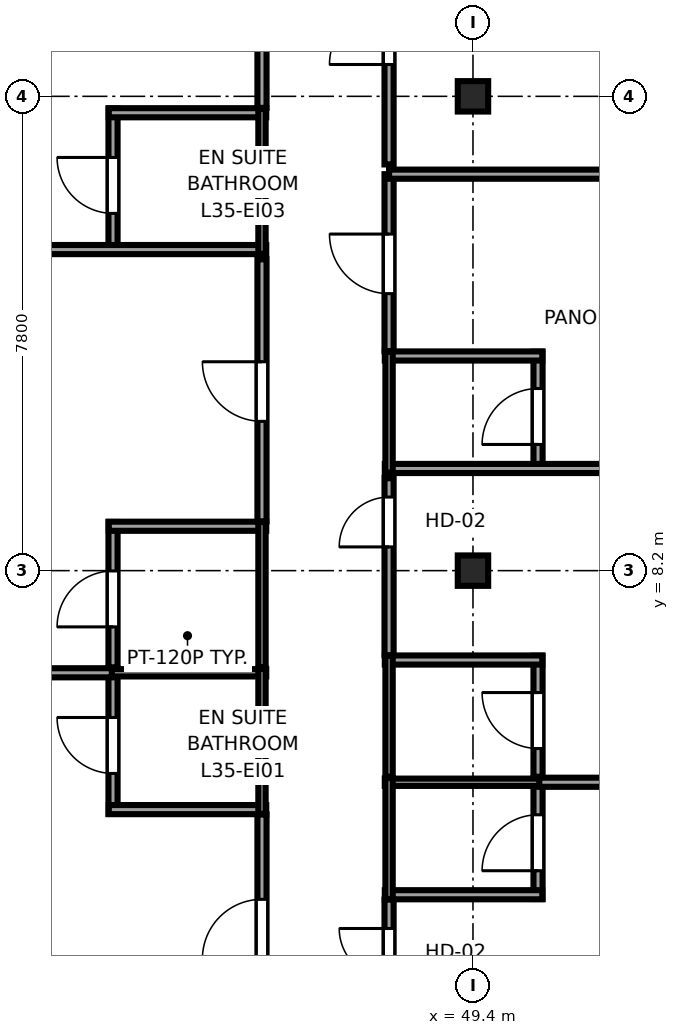
"""IFC4 building model, lengths in metres.
Left out: names, types, materials, properties, quantities, classifications, styles, units other than length and angle.
Written with IfcOpenShell. Run it as: python <this file> out.ifc"""

import sys

from ifc_helpers import new_model, si_unit, direction, frame, frame_2d, origin, origin_2d, place, context, subcontext, project, spatial, rectangle, i_section, extrude, source, transform, mapped, element, fill, save


model = new_model("IFC4")
c1 = context("Model", 3, precision=1e-05, world=origin(), true_north=direction((0.0, 1.0)))
c2 = subcontext(c1, "Body", "Model", "MODEL_VIEW")
j1 = project(units=[si_unit("LENGTHUNIT", "METRE"), si_unit("PLANEANGLEUNIT", "RADIAN")], contexts=[c1])
p1 = place(None, origin())
s1 = spatial("IfcSite", under=j1, at=p1, CompositionType="ELEMENT")
p2 = place(p1, origin())
s2 = spatial("IfcBuilding", under=s1, at=p2, CompositionType="ELEMENT")
p3 = place(p2, frame((0.0, 0.0, 136.4)))
s3 = spatial("IfcBuildingStorey", under=s2, at=p3, CompositionType="ELEMENT", Elevation=136.4)
m1 = source(origin(), c2, "Body", "SweptSolid", [
    extrude(i_section(OverallWidth=0.5, OverallDepth=0.5, WebThickness=0.022, FlangeThickness=0.034, at=origin_2d()), origin(), (0.0, 0.0, 1.0), 3.55),
])
for number, where, z_axis, x_axis in (
    (1, (49.4, 8.2, 0.0), (0.0, 0.0, 1.0), (1.0, 0.0, 0.0)),
    (2, (49.4, 16.0, 0.0), (0.0, 0.0, 1.0), (1.0, 0.0, 0.0)),
):
    element("IfcColumn", number, at=place(p3, frame(where, z_axis=z_axis, x_axis=x_axis)), inside=s3, PredefinedType="COLUMN", context=c2, shape_type="MappedRepresentation", body=[
        mapped(m1, transform((0.0, 0.0, 0.0), x_axis=(1.0, 0.0, 0.0), y_axis=(0.0, 1.0, 0.0), z_axis=(0.0, 0.0, 1.0), scale=1.0)),
    ])
p4 = place(p3, frame((43.48, 4.2, 0.0), z_axis=(0.0, 0.0, 1.0), x_axis=(0.0, 1.0, 0.0)))
e3 = element("IfcWall", 3, at=p4, inside=s3, PredefinedType="PARTITIONING", context=c2, shape_type="SweptSolid", body=[
    extrude(rectangle(XDim=2.39, YDim=0.15, at=frame_2d((1.195, 0.0))), origin(), (0.0, 0.0, 1.0), 3.37),
])
p5 = place(p4, frame((0.665, 0.0, 0.0)))
e4 = element("IfcOpeningElement", 4, at=p5, cuts=e3, PredefinedType="OPENING", context=c2, shape_type="SweptSolid", body=[
    extrude(rectangle(XDim=0.92, YDim=2.01, at=frame_2d((0.46, 1.005))), frame((0.0, 0.085, 0.0), z_axis=(0.0, -1.0, 0.0), x_axis=(1.0, 0.0, 0.0)), (0.0, 0.0, 1.0), 0.17),
])
p6 = place(p3, frame((43.41, 4.27, 0.0), z_axis=(0.0, 0.0, 1.0), x_axis=(1.0, 0.0, 0.0)))
e5 = element("IfcWall", 5, at=p6, inside=s3, PredefinedType="PARTITIONING", context=c2, shape_type="SweptSolid", body=[
    extrude(rectangle(XDim=2.59, YDim=0.15, at=frame_2d((1.295, 0.0))), origin(), (0.0, 0.0, 1.0), 3.37),
])
p7 = place(p3, frame((43.41, 6.52, 0.0), z_axis=(0.0, 0.0, 1.0), x_axis=(1.0, 0.0, 0.0)))
e6 = element("IfcWall", 6, at=p7, inside=s3, PredefinedType="PLUMBINGWALL", context=c2, shape_type="SweptSolid", body=[
    extrude(rectangle(XDim=2.59, YDim=0.12, at=frame_2d((1.295, 0.0))), origin(), (0.0, 0.0, 1.0), 3.37),
])
p8 = place(p3, frame((45.93, 4.2, 0.0), z_axis=(0.0, 0.0, 1.0), x_axis=(0.0, 1.0, 0.0)))
e7 = element("IfcWall", 7, at=p8, inside=s3, PredefinedType="PLUMBINGWALL", context=c2, shape_type="SweptSolid", body=[
    extrude(rectangle(XDim=2.39, YDim=0.12, at=frame_2d((1.195, 0.0))), origin(), (0.0, 0.0, 1.0), 3.37),
])
p9 = place(p3, frame((43.48, 6.61, 0.0), z_axis=(0.0, 0.0, 1.0), x_axis=(0.0, 1.0, 0.0)))
e8 = element("IfcWall", 8, at=p9, inside=s3, PredefinedType="PARTITIONING", context=c2, shape_type="SweptSolid", body=[
    extrude(rectangle(XDim=2.39, YDim=0.15, at=frame_2d((1.195, 0.0))), origin(), (0.0, 0.0, 1.0), 3.37),
])
p10 = place(p9, frame((0.665, 0.0, 0.0)))
e9 = element("IfcOpeningElement", 9, at=p10, cuts=e8, PredefinedType="OPENING", context=c2, shape_type="SweptSolid", body=[
    extrude(rectangle(XDim=0.92, YDim=2.01, at=frame_2d((0.46, 1.005))), frame((0.0, 0.085, 0.0), z_axis=(0.0, -1.0, 0.0), x_axis=(1.0, 0.0, 0.0)), (0.0, 0.0, 1.0), 0.17),
])
p11 = place(p3, frame((43.41, 8.93, 0.0), z_axis=(0.0, 0.0, 1.0), x_axis=(1.0, 0.0, 0.0)))
e10 = element("IfcWall", 10, at=p11, inside=s3, PredefinedType="PARTITIONING", context=c2, shape_type="SweptSolid", body=[
    extrude(rectangle(XDim=2.59, YDim=0.15, at=frame_2d((1.295, 0.0))), origin(), (0.0, 0.0, 1.0), 3.37),
])
p12 = place(p3, frame((45.93, 6.61, 0.0), z_axis=(0.0, 0.0, 1.0), x_axis=(0.0, 1.0, 0.0)))
e11 = element("IfcWall", 11, at=p12, inside=s3, PredefinedType="PLUMBINGWALL", context=c2, shape_type="SweptSolid", body=[
    extrude(rectangle(XDim=2.39, YDim=0.12, at=frame_2d((1.195, 0.0))), origin(), (0.0, 0.0, 1.0), 3.37),
])
p13 = place(p3, frame((43.48, 13.41, 0.0), z_axis=(0.0, 0.0, 1.0), x_axis=(0.0, 1.0, 0.0)))
e12 = element("IfcWall", 12, at=p13, inside=s3, PredefinedType="PARTITIONING", context=c2, shape_type="SweptSolid", body=[
    extrude(rectangle(XDim=2.39, YDim=0.15, at=frame_2d((1.195, 0.0))), origin(), (0.0, 0.0, 1.0), 3.37),
])
p14 = place(p13, frame((0.665, 0.0, 0.0)))
e13 = element("IfcOpeningElement", 13, at=p14, cuts=e12, PredefinedType="OPENING", context=c2, shape_type="SweptSolid", body=[
    extrude(rectangle(XDim=0.92, YDim=2.01, at=frame_2d((0.46, 1.005))), frame((0.0, 0.085, 0.0), z_axis=(0.0, -1.0, 0.0), x_axis=(1.0, 0.0, 0.0)), (0.0, 0.0, 1.0), 0.17),
])
p15 = place(p3, frame((34.65, 13.48, 0.0), z_axis=(0.0, 0.0, 1.0), x_axis=(1.0, 0.0, 0.0)))
e14 = element("IfcWall", 14, at=p15, inside=s3, PredefinedType="PARTITIONING", context=c2, shape_type="SweptSolid", body=[
    extrude(rectangle(XDim=11.35, YDim=0.15, at=frame_2d((5.675, 0.0))), origin(), (0.0, 0.0, 1.0), 3.37),
])
p16 = place(p3, frame((43.41, 15.73, 0.0), z_axis=(0.0, 0.0, 1.0), x_axis=(1.0, 0.0, 0.0)))
e15 = element("IfcWall", 15, at=p16, inside=s3, PredefinedType="PARTITIONING", context=c2, shape_type="SweptSolid", body=[
    extrude(rectangle(XDim=2.59, YDim=0.15, at=frame_2d((1.295, 0.0))), origin(), (0.0, 0.0, 1.0), 3.37),
])
p17 = place(p3, frame((45.93, 13.41, 0.0), z_axis=(0.0, 0.0, 1.0), x_axis=(0.0, 1.0, 0.0)))
e16 = element("IfcWall", 16, at=p17, inside=s3, PredefinedType="PLUMBINGWALL", context=c2, shape_type="SweptSolid", body=[
    extrude(rectangle(XDim=2.39, YDim=0.12, at=frame_2d((1.195, 0.0))), origin(), (0.0, 0.0, 1.0), 3.37),
])
p18 = place(p3, frame((50.47, 2.8, 0.0), z_axis=(0.0, 0.0, 1.0), x_axis=(0.0, 1.0, 0.0)))
e17 = element("IfcWall", 17, at=p18, inside=s3, PredefinedType="PARTITIONING", context=c2, shape_type="SweptSolid", body=[
    extrude(rectangle(XDim=1.99, YDim=0.15, at=frame_2d((0.995, 0.0))), origin(), (0.0, 0.0, 1.0), 3.37),
])
p19 = place(p18, frame((0.465, 0.0, 0.0)))
e18 = element("IfcOpeningElement", 18, at=p19, cuts=e17, PredefinedType="OPENING", context=c2, shape_type="SweptSolid", body=[
    extrude(rectangle(XDim=0.92, YDim=2.01, at=frame_2d((0.46, 1.005))), frame((0.0, 0.085, 0.0), z_axis=(0.0, -1.0, 0.0), x_axis=(1.0, 0.0, 0.0)), (0.0, 0.0, 1.0), 0.17),
])
p20 = place(p3, frame((47.95, 2.87, 0.0), z_axis=(0.0, 0.0, 1.0), x_axis=(1.0, 0.0, 0.0)))
e19 = element("IfcWall", 19, at=p20, inside=s3, PredefinedType="PARTITIONING", context=c2, shape_type="SweptSolid", body=[
    extrude(rectangle(XDim=2.59, YDim=0.15, at=frame_2d((1.295, 0.0))), origin(), (0.0, 0.0, 1.0), 3.37),
])
p21 = place(p3, frame((47.95, 4.72, 0.0), z_axis=(0.0, 0.0, 1.0), x_axis=(1.0, 0.0, 0.0)))
e20 = element("IfcWall", 20, at=p21, inside=s3, PredefinedType="PLUMBINGWALL", context=c2, shape_type="SweptSolid", body=[
    extrude(rectangle(XDim=2.59, YDim=0.12, at=frame_2d((1.295, 0.0))), origin(), (0.0, 0.0, 1.0), 3.37),
])
p22 = place(p3, frame((48.02, 2.8, 0.0), z_axis=(0.0, 0.0, 1.0), x_axis=(0.0, 1.0, 0.0)))
e21 = element("IfcWall", 21, at=p22, inside=s3, PredefinedType="PLUMBINGWALL", context=c2, shape_type="SweptSolid", body=[
    extrude(rectangle(XDim=1.99, YDim=0.12, at=frame_2d((0.995, 0.0))), origin(), (0.0, 0.0, 1.0), 3.37),
])
p23 = place(p3, frame((50.47, 4.81, 0.0), z_axis=(0.0, 0.0, 1.0), x_axis=(0.0, 1.0, 0.0)))
e22 = element("IfcWall", 22, at=p23, inside=s3, PredefinedType="PARTITIONING", context=c2, shape_type="SweptSolid", body=[
    extrude(rectangle(XDim=1.99, YDim=0.15, at=frame_2d((0.995, 0.0))), origin(), (0.0, 0.0, 1.0), 3.37),
])
p24 = place(p23, frame((0.465, 0.0, 0.0)))
e23 = element("IfcOpeningElement", 23, at=p24, cuts=e22, PredefinedType="OPENING", context=c2, shape_type="SweptSolid", body=[
    extrude(rectangle(XDim=0.92, YDim=2.01, at=frame_2d((0.46, 1.005))), frame((0.0, 0.085, 0.0), z_axis=(0.0, -1.0, 0.0), x_axis=(1.0, 0.0, 0.0)), (0.0, 0.0, 1.0), 0.17),
])
p25 = place(p3, frame((47.95, 6.73, 0.0), z_axis=(0.0, 0.0, 1.0), x_axis=(1.0, 0.0, 0.0)))
e24 = element("IfcWall", 24, at=p25, inside=s3, PredefinedType="PARTITIONING", context=c2, shape_type="SweptSolid", body=[
    extrude(rectangle(XDim=2.59, YDim=0.15, at=frame_2d((1.295, 0.0))), origin(), (0.0, 0.0, 1.0), 3.37),
])
p26 = place(p3, frame((48.02, 4.81, 0.0), z_axis=(0.0, 0.0, 1.0), x_axis=(0.0, 1.0, 0.0)))
e25 = element("IfcWall", 25, at=p26, inside=s3, PredefinedType="PLUMBINGWALL", context=c2, shape_type="SweptSolid", body=[
    extrude(rectangle(XDim=1.99, YDim=0.12, at=frame_2d((0.995, 0.0))), origin(), (0.0, 0.0, 1.0), 3.37),
])
p27 = place(p3, frame((50.47, 9.81, 0.0), z_axis=(0.0, 0.0, 1.0), x_axis=(0.0, 1.0, 0.0)))
e26 = element("IfcWall", 26, at=p27, inside=s3, PredefinedType="PARTITIONING", context=c2, shape_type="SweptSolid", body=[
    extrude(rectangle(XDim=1.99, YDim=0.15, at=frame_2d((0.995, 0.0))), origin(), (0.0, 0.0, 1.0), 3.37),
])
p28 = place(p27, frame((0.465, 0.0, 0.0)))
e27 = element("IfcOpeningElement", 27, at=p28, cuts=e26, PredefinedType="OPENING", context=c2, shape_type="SweptSolid", body=[
    extrude(rectangle(XDim=0.92, YDim=2.01, at=frame_2d((0.46, 1.005))), frame((0.0, 0.085, 0.0), z_axis=(0.0, -1.0, 0.0), x_axis=(1.0, 0.0, 0.0)), (0.0, 0.0, 1.0), 0.17),
])
p29 = place(p3, frame((47.95, 9.88, 0.0), z_axis=(0.0, 0.0, 1.0), x_axis=(1.0, 0.0, 0.0)))
e28 = element("IfcWall", 28, at=p29, inside=s3, PredefinedType="PARTITIONING", context=c2, shape_type="SweptSolid", body=[
    extrude(rectangle(XDim=8.645, YDim=0.15, at=frame_2d((4.323, 0.0))), origin(), (0.0, 0.0, 1.0), 3.37),
])
p30 = place(p3, frame((47.95, 11.73, 0.0), z_axis=(0.0, 0.0, 1.0), x_axis=(1.0, 0.0, 0.0)))
e29 = element("IfcWall", 29, at=p30, inside=s3, PredefinedType="PARTITIONING", context=c2, shape_type="SweptSolid", body=[
    extrude(rectangle(XDim=2.59, YDim=0.15, at=frame_2d((1.295, 0.0))), origin(), (0.0, 0.0, 1.0), 3.37),
])
p31 = place(p3, frame((48.02, 9.81, 0.0), z_axis=(0.0, 0.0, 1.0), x_axis=(0.0, 1.0, 0.0)))
e30 = element("IfcWall", 30, at=p31, inside=s3, PredefinedType="PLUMBINGWALL", context=c2, shape_type="SweptSolid", body=[
    extrude(rectangle(XDim=1.99, YDim=0.12, at=frame_2d((0.995, 0.0))), origin(), (0.0, 0.0, 1.0), 3.37),
])
p32 = place(p3, frame((45.93, 0.405, 0.0), z_axis=(0.0, 0.0, 1.0), x_axis=(0.0, 1.0, 0.0)))
e31 = element("IfcWall", 31, at=p32, inside=s3, PredefinedType="PARTITIONING", context=c2, shape_type="SweptSolid", body=[
    extrude(rectangle(XDim=3.785, YDim=0.15, at=frame_2d((1.893, 0.0))), origin(), (0.0, 0.0, 1.0), 3.37),
])
p33 = place(p32, frame((1.41, 0.0, 0.0)))
e32 = element("IfcOpeningElement", 32, at=p33, cuts=e31, PredefinedType="OPENING", context=c2, shape_type="SweptSolid", body=[
    extrude(rectangle(XDim=0.98, YDim=2.12, at=frame_2d((0.49, 1.06))), frame((0.0, 0.085, 0.0), z_axis=(0.0, -1.0, 0.0), x_axis=(1.0, 0.0, 0.0)), (0.0, 0.0, 1.0), 0.17),
])
p34 = place(p3, frame((34.65, 6.52, 0.0), z_axis=(0.0, 0.0, 1.0), x_axis=(1.0, 0.0, 0.0)))
e33 = element("IfcWall", 33, at=p34, inside=s3, PredefinedType="PARTITIONING", context=c2, shape_type="SweptSolid", body=[
    extrude(rectangle(XDim=8.81, YDim=0.15, at=frame_2d((4.405, 0.0))), origin(), (0.0, 0.0, 1.0), 3.37),
])
p35 = place(p3, frame((45.93, 9.01, 0.0), z_axis=(0.0, 0.0, 1.0), x_axis=(0.0, 1.0, 0.0)))
e34 = element("IfcWall", 34, at=p35, inside=s3, PredefinedType="PARTITIONING", context=c2, shape_type="SweptSolid", body=[
    extrude(rectangle(XDim=4.31, YDim=0.15, at=frame_2d((2.155, 0.0))), origin(), (0.0, 0.0, 1.0), 3.37),
])
p36 = place(p35, frame((1.645, 0.0, 0.0)))
e35 = element("IfcOpeningElement", 35, at=p36, cuts=e34, PredefinedType="OPENING", context=c2, shape_type="SweptSolid", body=[
    extrude(rectangle(XDim=0.98, YDim=2.12, at=frame_2d((0.49, 1.06))), frame((0.0, 0.085, 0.0), z_axis=(0.0, -1.0, 0.0), x_axis=(1.0, 0.0, 0.0)), (0.0, 0.0, 1.0), 0.17),
])
p37 = place(p3, frame((45.93, 15.81, 0.0), z_axis=(0.0, 0.0, 1.0), x_axis=(0.0, 1.0, 0.0)))
e36 = element("IfcWall", 36, at=p37, inside=s3, PredefinedType="PARTITIONING", context=c2, shape_type="SweptSolid", body=[
    extrude(rectangle(XDim=4.21, YDim=0.15, at=frame_2d((2.105, 0.0))), origin(), (0.0, 0.0, 1.0), 3.37),
])
p38 = place(p37, frame((1.595, 0.0, 0.0)))
e37 = element("IfcOpeningElement", 37, at=p38, cuts=e36, PredefinedType="OPENING", context=c2, shape_type="SweptSolid", body=[
    extrude(rectangle(XDim=0.98, YDim=2.12, at=frame_2d((0.49, 1.06))), frame((0.0, 0.085, 0.0), z_axis=(0.0, -1.0, 0.0), x_axis=(1.0, 0.0, 0.0)), (0.0, 0.0, 1.0), 0.17),
])
p39 = place(p3, frame((48.02, 0.405, 0.0), z_axis=(0.0, 0.0, 1.0), x_axis=(0.0, 1.0, 0.0)))
e38 = element("IfcWall", 38, at=p39, inside=s3, PredefinedType="PARTITIONING", context=c2, shape_type="SweptSolid", body=[
    extrude(rectangle(XDim=2.385, YDim=0.15, at=frame_2d((1.192, 0.0))), origin(), (0.0, 0.0, 1.0), 3.37),
])
p40 = place(p39, frame((1.09, 0.0, 0.0)))
e39 = element("IfcOpeningElement", 39, at=p40, cuts=e38, PredefinedType="OPENING", context=c2, shape_type="SweptSolid", body=[
    extrude(rectangle(XDim=0.82, YDim=2.01, at=frame_2d((0.41, 1.005))), frame((0.0, 0.085, 0.0), z_axis=(0.0, -1.0, 0.0), x_axis=(1.0, 0.0, 0.0)), (0.0, 0.0, 1.0), 0.17),
])
p41 = place(p3, frame((50.49, 4.72, 0.0), z_axis=(0.0, 0.0, 1.0), x_axis=(1.0, 0.0, 0.0)))
e40 = element("IfcWall", 40, at=p41, inside=s3, PredefinedType="PARTITIONING", context=c2, shape_type="SweptSolid", body=[
    extrude(rectangle(XDim=6.105, YDim=0.15, at=frame_2d((3.052, 0.0))), origin(), (0.0, 0.0, 1.0), 3.37),
])
p42 = place(p3, frame((48.02, 6.81, 0.0), z_axis=(0.0, 0.0, 1.0), x_axis=(0.0, 1.0, 0.0)))
e41 = element("IfcWall", 41, at=p42, inside=s3, PredefinedType="PARTITIONING", context=c2, shape_type="SweptSolid", body=[
    extrude(rectangle(XDim=2.91, YDim=0.15, at=frame_2d((1.455, 0.0))), origin(), (0.0, 0.0, 1.0), 3.37),
])
p43 = place(p42, frame((1.78, 0.0, 0.0)))
e42 = element("IfcOpeningElement", 42, at=p43, cuts=e41, PredefinedType="OPENING", context=c2, shape_type="SweptSolid", body=[
    extrude(rectangle(XDim=0.82, YDim=2.01, at=frame_2d((0.41, 1.005))), frame((0.0, 0.085, 0.0), z_axis=(0.0, -1.0, 0.0), x_axis=(1.0, 0.0, 0.0)), (0.0, 0.0, 1.0), 0.17),
])
p44 = place(p3, frame((48.02, 11.81, 0.0), z_axis=(0.0, 0.0, 1.0), x_axis=(0.0, 1.0, 0.0)))
e43 = element("IfcWall", 43, at=p44, inside=s3, PredefinedType="PARTITIONING", context=c2, shape_type="SweptSolid", body=[
    extrude(rectangle(XDim=2.91, YDim=0.15, at=frame_2d((1.455, 0.0))), origin(), (0.0, 0.0, 1.0), 3.37),
])
p45 = place(p44, frame((0.945, 0.0, 0.0)))
e44 = element("IfcOpeningElement", 44, at=p45, cuts=e43, PredefinedType="OPENING", context=c2, shape_type="SweptSolid", body=[
    extrude(rectangle(XDim=0.98, YDim=2.12, at=frame_2d((0.49, 1.06))), frame((0.0, 0.085, 0.0), z_axis=(0.0, -1.0, 0.0), x_axis=(1.0, 0.0, 0.0)), (0.0, 0.0, 1.0), 0.17),
])
p46 = place(p3, frame((48.02, 14.72, 0.0), z_axis=(0.0, 0.0, 1.0), x_axis=(1.0, 0.0, 0.0)))
e45 = element("IfcWall", 45, at=p46, inside=s3, PredefinedType="PARTITIONING", context=c2, shape_type="SweptSolid", body=[
    extrude(rectangle(XDim=8.575, YDim=0.15, at=frame_2d((4.288, 0.0))), origin(), (0.0, 0.0, 1.0), 3.37),
])
p47 = place(p3, frame((48.02, 14.88, 0.0), z_axis=(0.0, 0.0, 1.0), x_axis=(0.0, 1.0, 0.0)))
e46 = element("IfcWall", 46, at=p47, inside=s3, PredefinedType="PARTITIONING", context=c2, shape_type="SweptSolid", body=[
    extrude(rectangle(XDim=3.107, YDim=0.15, at=frame_2d((1.554, 0.0))), origin(), (0.0, 0.0, 1.0), 3.37),
])
p48 = place(p47, frame((1.644, 0.0, 0.0)))
e47 = element("IfcOpeningElement", 47, at=p48, cuts=e46, PredefinedType="OPENING", context=c2, shape_type="SweptSolid", body=[
    extrude(rectangle(XDim=0.98, YDim=2.12, at=frame_2d((0.49, 1.06))), frame((0.0, 0.085, 0.0), z_axis=(0.0, -1.0, 0.0), x_axis=(1.0, 0.0, 0.0)), (0.0, 0.0, 1.0), 0.17),
])
m2 = source(origin(), c2, "Body", "SweptSolid", [
    extrude(rectangle(XDim=0.92, YDim=2.01, at=frame_2d((0.46, 1.005))), frame((0.0, 0.025, 0.0), z_axis=(0.0, -1.0, 0.0), x_axis=(1.0, 0.0, 0.0)), (0.0, 0.0, 1.0), 0.05),
])
p49 = place(p5, origin())
e48 = element("IfcDoor", 48, at=p49, inside=s3, OperationType="SINGLE_SWING_RIGHT", PredefinedType="DOOR", context=c2, shape_type="MappedRepresentation", body=[
    mapped(m2, transform((0.0, 0.0, 0.0), x_axis=(1.0, 0.0, 0.0), y_axis=(0.0, 1.0, 0.0), z_axis=(0.0, 0.0, 1.0), scale=1.0)),
])
fill(e4, e48)
p50 = place(p10, origin())
e49 = element("IfcDoor", 49, at=p50, inside=s3, OperationType="SINGLE_SWING_LEFT", PredefinedType="DOOR", context=c2, shape_type="MappedRepresentation", body=[
    mapped(m2, transform((0.0, 0.0, 0.0), x_axis=(1.0, 0.0, 0.0), y_axis=(0.0, 1.0, 0.0), z_axis=(0.0, 0.0, 1.0), scale=1.0)),
])
fill(e9, e49)
p51 = place(p14, origin())
e50 = element("IfcDoor", 50, at=p51, inside=s3, OperationType="SINGLE_SWING_RIGHT", PredefinedType="DOOR", context=c2, shape_type="MappedRepresentation", body=[
    mapped(m2, transform((0.0, 0.0, 0.0), x_axis=(1.0, 0.0, 0.0), y_axis=(0.0, 1.0, 0.0), z_axis=(0.0, 0.0, 1.0), scale=1.0)),
])
fill(e13, e50)
p52 = place(p19, origin())
e51 = element("IfcDoor", 51, at=p52, inside=s3, OperationType="SINGLE_SWING_LEFT", PredefinedType="DOOR", context=c2, shape_type="MappedRepresentation", body=[
    mapped(m2, transform((0.0, 0.0, 0.0), x_axis=(1.0, 0.0, 0.0), y_axis=(0.0, 1.0, 0.0), z_axis=(0.0, 0.0, 1.0), scale=1.0)),
])
fill(e18, e51)
p53 = place(p24, origin())
e52 = element("IfcDoor", 52, at=p53, inside=s3, OperationType="SINGLE_SWING_RIGHT", PredefinedType="DOOR", context=c2, shape_type="MappedRepresentation", body=[
    mapped(m2, transform((0.0, 0.0, 0.0), x_axis=(1.0, 0.0, 0.0), y_axis=(0.0, 1.0, 0.0), z_axis=(0.0, 0.0, 1.0), scale=1.0)),
])
fill(e23, e52)
p54 = place(p28, origin())
e53 = element("IfcDoor", 53, at=p54, inside=s3, OperationType="SINGLE_SWING_LEFT", PredefinedType="DOOR", context=c2, shape_type="MappedRepresentation", body=[
    mapped(m2, transform((0.0, 0.0, 0.0), x_axis=(1.0, 0.0, 0.0), y_axis=(0.0, 1.0, 0.0), z_axis=(0.0, 0.0, 1.0), scale=1.0)),
])
fill(e27, e53)
m3 = source(origin(), c2, "Body", "SweptSolid", [
    extrude(rectangle(XDim=0.98, YDim=2.12, at=frame_2d((0.49, 1.06))), frame((0.0, 0.025, 0.0), z_axis=(0.0, -1.0, 0.0), x_axis=(1.0, 0.0, 0.0)), (0.0, 0.0, 1.0), 0.05),
])
p55 = place(p33, origin())
e54 = element("IfcDoor", 54, at=p55, inside=s3, OperationType="SINGLE_SWING_LEFT", PredefinedType="DOOR", context=c2, shape_type="MappedRepresentation", body=[
    mapped(m3, transform((0.0, 0.0, 0.0), x_axis=(1.0, 0.0, 0.0), y_axis=(0.0, 1.0, 0.0), z_axis=(0.0, 0.0, 1.0), scale=1.0)),
])
fill(e32, e54)
p56 = place(p36, origin())
e55 = element("IfcDoor", 55, at=p56, inside=s3, OperationType="SINGLE_SWING_RIGHT", PredefinedType="DOOR", context=c2, shape_type="MappedRepresentation", body=[
    mapped(m3, transform((0.0, 0.0, 0.0), x_axis=(1.0, 0.0, 0.0), y_axis=(0.0, 1.0, 0.0), z_axis=(0.0, 0.0, 1.0), scale=1.0)),
])
fill(e35, e55)
m4 = source(origin(), c2, "Body", "SweptSolid", [
    extrude(rectangle(XDim=0.82, YDim=2.01, at=frame_2d((0.41, 1.005))), frame((0.0, 0.025, 0.0), z_axis=(0.0, -1.0, 0.0), x_axis=(1.0, 0.0, 0.0)), (0.0, 0.0, 1.0), 0.05),
])
p57 = place(p40, origin())
e56 = element("IfcDoor", 56, at=p57, inside=s3, OperationType="SINGLE_SWING_RIGHT", PredefinedType="DOOR", context=c2, shape_type="MappedRepresentation", body=[
    mapped(m4, transform((0.0, 0.0, 0.0), x_axis=(1.0, 0.0, 0.0), y_axis=(0.0, 1.0, 0.0), z_axis=(0.0, 0.0, 1.0), scale=1.0)),
])
fill(e39, e56)
p58 = place(p43, origin())
e57 = element("IfcDoor", 57, at=p58, inside=s3, OperationType="SINGLE_SWING_LEFT", PredefinedType="DOOR", context=c2, shape_type="MappedRepresentation", body=[
    mapped(m4, transform((0.0, 0.0, 0.0), x_axis=(1.0, 0.0, 0.0), y_axis=(0.0, 1.0, 0.0), z_axis=(0.0, 0.0, 1.0), scale=1.0)),
])
fill(e42, e57)
p59 = place(p45, origin())
e58 = element("IfcDoor", 58, at=p59, inside=s3, OperationType="SINGLE_SWING_RIGHT", PredefinedType="DOOR", context=c2, shape_type="MappedRepresentation", body=[
    mapped(m3, transform((0.0, 0.0, 0.0), x_axis=(1.0, 0.0, 0.0), y_axis=(0.0, 1.0, 0.0), z_axis=(0.0, 0.0, 1.0), scale=1.0)),
])
fill(e44, e58)
p60 = place(p48, origin())
e59 = element("IfcDoor", 59, at=p60, inside=s3, OperationType="SINGLE_SWING_LEFT", PredefinedType="DOOR", context=c2, shape_type="MappedRepresentation", body=[
    mapped(m3, transform((0.0, 0.0, 0.0), x_axis=(1.0, 0.0, 0.0), y_axis=(0.0, 1.0, 0.0), z_axis=(0.0, 0.0, 1.0), scale=1.0)),
])
fill(e47, e59)
save(model, sys.argv[1])
